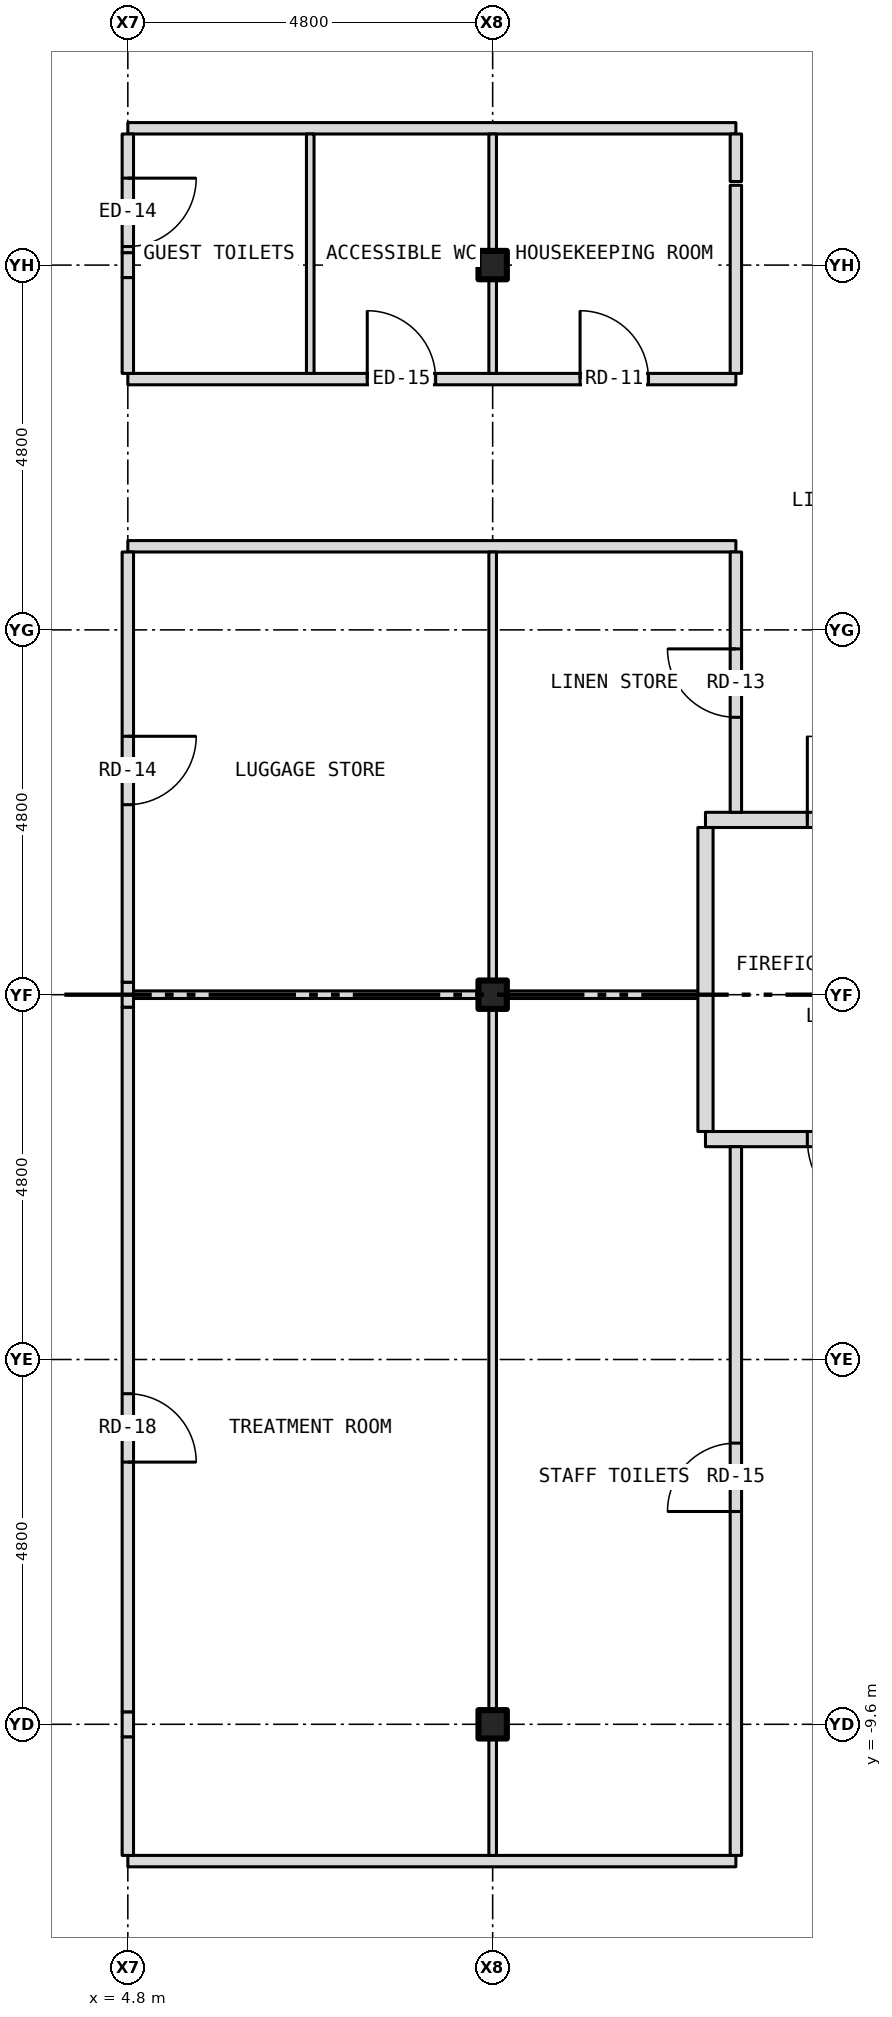
"""IFC4 building model, lengths in metres.
Left out: names, types, materials, properties, quantities, classifications, styles, units other than length and angle.
Written with IfcOpenShell. Run it as: python <this file> out.ifc"""

import sys

from ifc_helpers import new_model, si_unit, direction, frame, frame_2d, origin, origin_2d, place, context, subcontext, project, spatial, rectangle, i_section, extrude, element, fill, save


model = new_model("IFC4")
c1 = context("Model", 3, precision=1e-05, world=origin(), true_north=direction((0.0, 1.0)))
c2 = subcontext(c1, "Body", "Model", "MODEL_VIEW")
j1 = project(units=[si_unit("LENGTHUNIT", "METRE"), si_unit("PLANEANGLEUNIT", "RADIAN")], contexts=[c1])
p1 = place(None, origin())
s1 = spatial("IfcSite", under=j1, at=p1, CompositionType="ELEMENT")
p2 = place(p1, origin())
s2 = spatial("IfcBuilding", under=s1, at=p2, CompositionType="ELEMENT")
p3 = place(p2, frame((0.0, 0.0, 162.0)))
s3 = spatial("IfcBuildingStorey", under=s2, at=p3, CompositionType="ELEMENT", Elevation=162.0)
for number, where, z_axis, x_axis in (
    (1, (9.6, -9.6, -0.15), (0.0, 0.0, 1.0), (1.0, 0.0, 0.0)),
    (2, (9.6, 0.0, -0.15), (0.0, 0.0, 1.0), (1.0, 0.0, 0.0)),
    (3, (9.6, 9.6, -0.15), (0.0, 0.0, 1.0), (1.0, 0.0, 0.0)),
):
    element("IfcColumn", number, at=place(p3, frame(where, z_axis=z_axis, x_axis=x_axis)), inside=s3, PredefinedType="COLUMN", context=c2, shape_type="SweptSolid", body=[
        extrude(i_section(OverallWidth=0.373, OverallDepth=0.373, WebThickness=0.016, FlangeThickness=0.026, at=origin_2d()), origin(), (0.0, 0.0, 1.0), 3.5),
    ])
p4 = place(p3, frame((4.8, -11.4, 0.0), z_axis=(0.0, 0.0, 1.0), x_axis=(1.0, 0.0, 0.0)))
e4 = element("IfcWall", 4, at=p4, inside=s3, PredefinedType="PARTITIONING", context=c2, shape_type="SweptSolid", body=[
    extrude(rectangle(XDim=8.0, YDim=0.15, at=frame_2d((4.0, 0.0))), origin(), (0.0, 0.0, 1.0), 3.35),
])
p5 = place(p3, frame((12.4, -1.9, 0.0), z_axis=(0.0, 0.0, 1.0), x_axis=(1.0, 0.0, 0.0)))
e5 = element("IfcWall", 5, at=p5, inside=s3, PredefinedType="PARTITIONING", context=c2, shape_type="SweptSolid", body=[
    extrude(rectangle(XDim=3.28, YDim=0.2, at=frame_2d((1.64, 0.0))), origin(), (0.0, 0.0, 1.0), 3.35),
])
p6 = place(p5, frame((1.34, 0.0, 0.0)))
e6 = element("IfcOpeningElement", 6, at=p6, cuts=e5, PredefinedType="OPENING", context=c2, shape_type="SweptSolid", body=[
    extrude(rectangle(XDim=1.1, YDim=2.1, at=frame_2d((0.55, 1.05))), frame((0.0, 0.112, 0.0), z_axis=(0.0, -1.0, 0.0), x_axis=(1.0, 0.0, 0.0)), (0.0, 0.0, 1.0), 0.224),
])
p7 = place(p3, frame((4.8, 0.0, 0.0), z_axis=(0.0, 0.0, 1.0), x_axis=(1.0, 0.0, 0.0)))
e7 = element("IfcWall", 7, at=p7, inside=s3, PredefinedType="PARTITIONING", context=c2, shape_type="SweptSolid", body=[
    extrude(rectangle(XDim=4.613, YDim=0.1, at=frame_2d((2.307, 0.0))), origin(), (0.0, 0.0, 1.0), 2.728),
])
p8 = place(p3, frame((9.413, 0.0, 0.0), z_axis=(0.0, 0.0, 1.0), x_axis=(1.0, 0.0, 0.0)))
e8 = element("IfcWall", 8, at=p8, inside=s3, PredefinedType="PARTITIONING", context=c2, shape_type="SweptSolid", body=[
    extrude(rectangle(XDim=0.374, YDim=0.1, at=frame_2d((0.187, 0.0))), origin(), (0.0, 0.0, 1.0), 3.35),
])
p9 = place(p3, frame((9.787, 0.0, 0.0), z_axis=(0.0, 0.0, 1.0), x_axis=(1.0, 0.0, 0.0)))
e9 = element("IfcWall", 9, at=p9, inside=s3, PredefinedType="PARTITIONING", context=c2, shape_type="SweptSolid", body=[
    extrude(rectangle(XDim=2.613, YDim=0.1, at=frame_2d((1.306, 0.0))), origin(), (0.0, 0.0, 1.0), 2.728),
])
p10 = place(p3, frame((12.4, 2.3, 0.0), z_axis=(0.0, 0.0, 1.0), x_axis=(1.0, 0.0, 0.0)))
e10 = element("IfcWall", 10, at=p10, inside=s3, PredefinedType="PARTITIONING", context=c2, shape_type="SweptSolid", body=[
    extrude(rectangle(XDim=3.28, YDim=0.2, at=frame_2d((1.64, 0.0))), origin(), (0.0, 0.0, 1.0), 3.35),
])
p11 = place(p10, frame((1.34, 0.0, 0.0)))
e11 = element("IfcOpeningElement", 11, at=p11, cuts=e10, PredefinedType="OPENING", context=c2, shape_type="SweptSolid", body=[
    extrude(rectangle(XDim=1.1, YDim=2.1, at=frame_2d((0.55, 1.05))), frame((0.0, 0.112, 0.0), z_axis=(0.0, -1.0, 0.0), x_axis=(1.0, 0.0, 0.0)), (0.0, 0.0, 1.0), 0.224),
])
p12 = place(p3, frame((4.8, 5.9, 0.0), z_axis=(0.0, 0.0, 1.0), x_axis=(1.0, 0.0, 0.0)))
e12 = element("IfcWall", 12, at=p12, inside=s3, PredefinedType="PARTITIONING", context=c2, shape_type="SweptSolid", body=[
    extrude(rectangle(XDim=8.0, YDim=0.15, at=frame_2d((4.0, 0.0))), origin(), (0.0, 0.0, 1.0), 3.35),
])
p13 = place(p3, frame((4.8, 8.1, 0.0), z_axis=(0.0, 0.0, 1.0), x_axis=(1.0, 0.0, 0.0)))
e13 = element("IfcWall", 13, at=p13, inside=s3, PredefinedType="PARTITIONING", context=c2, shape_type="SweptSolid", body=[
    extrude(rectangle(XDim=8.0, YDim=0.15, at=frame_2d((4.0, 0.0))), origin(), (0.0, 0.0, 1.0), 3.35),
])
p14 = place(p13, frame((5.95, 0.0, 0.0)))
e14 = element("IfcOpeningElement", 14, at=p14, cuts=e13, PredefinedType="OPENING", context=c2, shape_type="SweptSolid", body=[
    extrude(rectangle(XDim=0.9, YDim=2.1, at=frame_2d((0.45, 1.05))), frame((0.0, 0.087, 0.0), z_axis=(0.0, -1.0, 0.0), x_axis=(1.0, 0.0, 0.0)), (0.0, 0.0, 1.0), 0.174),
])
p15 = place(p13, frame((3.15, 0.0, 0.0)))
e15 = element("IfcOpeningElement", 15, at=p15, cuts=e13, PredefinedType="OPENING", context=c2, shape_type="SweptSolid", body=[
    extrude(rectangle(XDim=0.9, YDim=2.1, at=frame_2d((0.45, 1.05))), frame((0.0, 0.087, 0.0), z_axis=(0.0, -1.0, 0.0), x_axis=(1.0, 0.0, 0.0)), (0.0, 0.0, 1.0), 0.174),
])
p16 = place(p3, frame((4.8, 11.4, 0.0), z_axis=(0.0, 0.0, 1.0), x_axis=(1.0, 0.0, 0.0)))
e16 = element("IfcWall", 16, at=p16, inside=s3, PredefinedType="PARTITIONING", context=c2, shape_type="SweptSolid", body=[
    extrude(rectangle(XDim=8.0, YDim=0.15, at=frame_2d((4.0, 0.0))), origin(), (0.0, 0.0, 1.0), 3.35),
])
p17 = place(p3, frame((4.8, -11.325, 0.0), z_axis=(0.0, 0.0, 1.0), x_axis=(0.0, 1.0, 0.0)))
e17 = element("IfcWall", 17, at=p17, inside=s3, PredefinedType="PARTITIONING", context=c2, shape_type="SweptSolid", body=[
    extrude(rectangle(XDim=1.561, YDim=0.15, at=frame_2d((0.781, 0.0))), origin(), (0.0, 0.0, 1.0), 2.817),
])
p18 = place(p3, frame((4.8, -9.764, 0.0), z_axis=(0.0, 0.0, 1.0), x_axis=(0.0, 1.0, 0.0)))
e18 = element("IfcWall", 18, at=p18, inside=s3, PredefinedType="PARTITIONING", context=c2, shape_type="SweptSolid", body=[
    extrude(rectangle(XDim=0.328, YDim=0.15, at=frame_2d((0.164, 0.0))), origin(), (0.0, 0.0, 1.0), 3.35),
])
p19 = place(p3, frame((4.8, -9.436, 0.0), z_axis=(0.0, 0.0, 1.0), x_axis=(0.0, 1.0, 0.0)))
e19 = element("IfcWall", 19, at=p19, inside=s3, PredefinedType="PARTITIONING", context=c2, shape_type="SweptSolid", body=[
    extrude(rectangle(XDim=9.272, YDim=0.15, at=frame_2d((4.636, 0.0))), origin(), (0.0, 0.0, 1.0), 2.817),
])
p20 = place(p19, frame((3.286, 0.0, 0.0)))
e20 = element("IfcOpeningElement", 20, at=p20, cuts=e19, PredefinedType="OPENING", context=c2, shape_type="SweptSolid", body=[
    extrude(rectangle(XDim=0.9, YDim=2.1, at=frame_2d((0.45, 1.05))), frame((0.0, 0.087, 0.0), z_axis=(0.0, -1.0, 0.0), x_axis=(1.0, 0.0, 0.0)), (0.0, 0.0, 1.0), 0.174),
])
p21 = place(p3, frame((4.8, -0.164, 0.0), z_axis=(0.0, 0.0, 1.0), x_axis=(0.0, 1.0, 0.0)))
e21 = element("IfcWall", 21, at=p21, inside=s3, PredefinedType="PARTITIONING", context=c2, shape_type="SweptSolid", body=[
    extrude(rectangle(XDim=0.328, YDim=0.15, at=frame_2d((0.164, 0.0))), origin(), (0.0, 0.0, 1.0), 3.35),
])
p22 = place(p3, frame((4.8, 0.164, 0.0), z_axis=(0.0, 0.0, 1.0), x_axis=(0.0, 1.0, 0.0)))
e22 = element("IfcWall", 22, at=p22, inside=s3, PredefinedType="PARTITIONING", context=c2, shape_type="SweptSolid", body=[
    extrude(rectangle(XDim=5.661, YDim=0.15, at=frame_2d((2.831, 0.0))), origin(), (0.0, 0.0, 1.0), 2.817),
])
p23 = place(p22, frame((2.336, 0.0, 0.0)))
e23 = element("IfcOpeningElement", 23, at=p23, cuts=e22, PredefinedType="OPENING", context=c2, shape_type="SweptSolid", body=[
    extrude(rectangle(XDim=0.9, YDim=2.1, at=frame_2d((0.45, 1.05))), frame((0.0, 0.087, 0.0), z_axis=(0.0, -1.0, 0.0), x_axis=(1.0, 0.0, 0.0)), (0.0, 0.0, 1.0), 0.174),
])
p24 = place(p3, frame((4.8, 8.175, 0.0), z_axis=(0.0, 0.0, 1.0), x_axis=(0.0, 1.0, 0.0)))
e24 = element("IfcWall", 24, at=p24, inside=s3, PredefinedType="PARTITIONING", context=c2, shape_type="SweptSolid", body=[
    extrude(rectangle(XDim=1.261, YDim=0.15, at=frame_2d((0.63, 0.0))), origin(), (0.0, 0.0, 1.0), 2.817),
])
p25 = place(p3, frame((4.8, 9.436, 0.0), z_axis=(0.0, 0.0, 1.0), x_axis=(0.0, 1.0, 0.0)))
e25 = element("IfcWall", 25, at=p25, inside=s3, PredefinedType="PARTITIONING", context=c2, shape_type="SweptSolid", body=[
    extrude(rectangle(XDim=0.328, YDim=0.15, at=frame_2d((0.164, 0.0))), origin(), (0.0, 0.0, 1.0), 3.35),
])
p26 = place(p3, frame((4.8, 9.764, 0.0), z_axis=(0.0, 0.0, 1.0), x_axis=(0.0, 1.0, 0.0)))
e26 = element("IfcWall", 26, at=p26, inside=s3, PredefinedType="PARTITIONING", context=c2, shape_type="SweptSolid", body=[
    extrude(rectangle(XDim=1.561, YDim=0.15, at=frame_2d((0.781, 0.0))), origin(), (0.0, 0.0, 1.0), 2.817),
])
p27 = place(p26, frame((0.08, 0.0, 0.0)))
e27 = element("IfcOpeningElement", 27, at=p27, cuts=e26, PredefinedType="OPENING", context=c2, shape_type="SweptSolid", body=[
    extrude(rectangle(XDim=0.9, YDim=2.1, at=frame_2d((0.45, 1.05))), frame((0.0, 0.087, 0.0), z_axis=(0.0, -1.0, 0.0), x_axis=(1.0, 0.0, 0.0)), (0.0, 0.0, 1.0), 0.174),
])
p28 = place(p3, frame((7.2, 8.175, 0.0), z_axis=(0.0, 0.0, 1.0), x_axis=(0.0, 1.0, 0.0)))
e28 = element("IfcWall", 28, at=p28, inside=s3, PredefinedType="PARTITIONING", context=c2, shape_type="SweptSolid", body=[
    extrude(rectangle(XDim=3.15, YDim=0.1, at=frame_2d((1.575, 0.0))), origin(), (0.0, 0.0, 1.0), 3.35),
])
p29 = place(p3, frame((9.6, -11.325, 0.0), z_axis=(0.0, 0.0, 1.0), x_axis=(0.0, 1.0, 0.0)))
e29 = element("IfcWall", 29, at=p29, inside=s3, PredefinedType="PARTITIONING", context=c2, shape_type="SweptSolid", body=[
    extrude(rectangle(XDim=1.538, YDim=0.1, at=frame_2d((0.769, 0.0))), origin(), (0.0, 0.0, 1.0), 2.728),
])
p30 = place(p3, frame((9.6, -9.787, 0.0), z_axis=(0.0, 0.0, 1.0), x_axis=(0.0, 1.0, 0.0)))
e30 = element("IfcWall", 30, at=p30, inside=s3, PredefinedType="PARTITIONING", context=c2, shape_type="SweptSolid", body=[
    extrude(rectangle(XDim=0.374, YDim=0.1, at=frame_2d((0.187, 0.0))), origin(), (0.0, 0.0, 1.0), 3.35),
])
p31 = place(p3, frame((9.6, -9.413, 0.0), z_axis=(0.0, 0.0, 1.0), x_axis=(0.0, 1.0, 0.0)))
e31 = element("IfcWall", 31, at=p31, inside=s3, PredefinedType="PARTITIONING", context=c2, shape_type="SweptSolid", body=[
    extrude(rectangle(XDim=9.363, YDim=0.1, at=frame_2d((4.682, 0.0))), origin(), (0.0, 0.0, 1.0), 2.728),
])
p32 = place(p3, frame((9.6, 0.05, 0.0), z_axis=(0.0, 0.0, 1.0), x_axis=(0.0, 1.0, 0.0)))
e32 = element("IfcWall", 32, at=p32, inside=s3, PredefinedType="PARTITIONING", context=c2, shape_type="SweptSolid", body=[
    extrude(rectangle(XDim=5.775, YDim=0.1, at=frame_2d((2.887, 0.0))), origin(), (0.0, 0.0, 1.0), 2.728),
])
p33 = place(p3, frame((9.6, 8.175, 0.0), z_axis=(0.0, 0.0, 1.0), x_axis=(0.0, 1.0, 0.0)))
e33 = element("IfcWall", 33, at=p33, inside=s3, PredefinedType="PARTITIONING", context=c2, shape_type="SweptSolid", body=[
    extrude(rectangle(XDim=1.238, YDim=0.1, at=frame_2d((0.619, 0.0))), origin(), (0.0, 0.0, 1.0), 2.728),
])
p34 = place(p3, frame((9.6, 9.413, 0.0), z_axis=(0.0, 0.0, 1.0), x_axis=(0.0, 1.0, 0.0)))
e34 = element("IfcWall", 34, at=p34, inside=s3, PredefinedType="PARTITIONING", context=c2, shape_type="SweptSolid", body=[
    extrude(rectangle(XDim=0.374, YDim=0.1, at=frame_2d((0.187, 0.0))), origin(), (0.0, 0.0, 1.0), 3.35),
])
p35 = place(p3, frame((9.6, 9.787, 0.0), z_axis=(0.0, 0.0, 1.0), x_axis=(0.0, 1.0, 0.0)))
e35 = element("IfcWall", 35, at=p35, inside=s3, PredefinedType="PARTITIONING", context=c2, shape_type="SweptSolid", body=[
    extrude(rectangle(XDim=1.538, YDim=0.1, at=frame_2d((0.769, 0.0))), origin(), (0.0, 0.0, 1.0), 2.728),
])
p36 = place(p3, frame((12.4, -1.8, 0.0), z_axis=(0.0, 0.0, 1.0), x_axis=(0.0, 1.0, 0.0)))
e36 = element("IfcWall", 36, at=p36, inside=s3, PredefinedType="PARTITIONING", context=c2, shape_type="SweptSolid", body=[
    extrude(rectangle(XDim=4.0, YDim=0.2, at=frame_2d((2.0, 0.0))), origin(), (0.0, 0.0, 1.0), 3.35),
])
p37 = place(p3, frame((12.8, -11.325, 0.0), z_axis=(0.0, 0.0, 1.0), x_axis=(0.0, 1.0, 0.0)))
e37 = element("IfcWall", 37, at=p37, inside=s3, PredefinedType="PARTITIONING", context=c2, shape_type="SweptSolid", body=[
    extrude(rectangle(XDim=9.325, YDim=0.15, at=frame_2d((4.663, 0.0))), origin(), (0.0, 0.0, 1.0), 3.35),
])
p38 = place(p37, frame((4.525, 0.0, 0.0)))
e38 = element("IfcOpeningElement", 38, at=p38, cuts=e37, PredefinedType="OPENING", context=c2, shape_type="SweptSolid", body=[
    extrude(rectangle(XDim=0.9, YDim=2.1, at=frame_2d((0.45, 1.05))), frame((0.0, 0.087, 0.0), z_axis=(0.0, -1.0, 0.0), x_axis=(1.0, 0.0, 0.0)), (0.0, 0.0, 1.0), 0.174),
])
p39 = place(p3, frame((12.8, 2.4, 0.0), z_axis=(0.0, 0.0, 1.0), x_axis=(0.0, 1.0, 0.0)))
e39 = element("IfcWall", 39, at=p39, inside=s3, PredefinedType="PARTITIONING", context=c2, shape_type="SweptSolid", body=[
    extrude(rectangle(XDim=3.425, YDim=0.15, at=frame_2d((1.712, 0.0))), origin(), (0.0, 0.0, 1.0), 3.35),
])
p40 = place(p39, frame((1.25, 0.0, 0.0)))
e40 = element("IfcOpeningElement", 40, at=p40, cuts=e39, PredefinedType="OPENING", context=c2, shape_type="SweptSolid", body=[
    extrude(rectangle(XDim=0.9, YDim=2.1, at=frame_2d((0.45, 1.05))), frame((0.0, 0.087, 0.0), z_axis=(0.0, -1.0, 0.0), x_axis=(1.0, 0.0, 0.0)), (0.0, 0.0, 1.0), 0.174),
])
p41 = place(p3, frame((12.8, 8.175, 0.0), z_axis=(0.0, 0.0, 1.0), x_axis=(0.0, 1.0, 0.0)))
e41 = element("IfcWall", 41, at=p41, inside=s3, PredefinedType="PARTITIONING", context=c2, shape_type="SweptSolid", body=[
    extrude(rectangle(XDim=2.475, YDim=0.15, at=frame_2d((1.237, 0.0))), origin(), (0.0, 0.0, 1.0), 3.35),
])
p42 = place(p3, frame((12.8, 10.7, 0.0), z_axis=(0.0, 0.0, 1.0), x_axis=(0.0, 1.0, 0.0)))
e42 = element("IfcWall", 42, at=p42, inside=s3, PredefinedType="PARTITIONING", context=c2, shape_type="SweptSolid", body=[
    extrude(rectangle(XDim=0.625, YDim=0.15, at=frame_2d((0.312, 0.0))), origin(), (0.0, 0.0, 1.0), 3.35),
])
p43 = place(p11, origin())
e43 = element("IfcDoor", 43, at=p43, inside=s3, OperationType="SINGLE_SWING_LEFT", PredefinedType="DOOR", context=c2, shape_type="SweptSolid", body=[
    extrude(rectangle(XDim=1.1, YDim=2.1, at=frame_2d((0.55, 1.05))), frame((0.0, 0.025, 0.0), z_axis=(0.0, -1.0, 0.0), x_axis=(1.0, 0.0, 0.0)), (0.0, 0.0, 1.0), 0.05),
])
fill(e11, e43)
p44 = place(p6, origin())
e44 = element("IfcDoor", 44, at=p44, inside=s3, OperationType="SINGLE_SWING_RIGHT", PredefinedType="DOOR", context=c2, shape_type="SweptSolid", body=[
    extrude(rectangle(XDim=1.1, YDim=2.1, at=frame_2d((0.55, 1.05))), frame((0.0, 0.025, 0.0), z_axis=(0.0, -1.0, 0.0), x_axis=(1.0, 0.0, 0.0)), (0.0, 0.0, 1.0), 0.05),
])
fill(e6, e44)
p45 = place(p14, origin())
e45 = element("IfcDoor", 45, at=p45, inside=s3, OperationType="SINGLE_SWING_LEFT", PredefinedType="DOOR", context=c2, shape_type="SweptSolid", body=[
    extrude(rectangle(XDim=0.9, YDim=2.1, at=frame_2d((0.45, 1.05))), frame((0.0, 0.025, 0.0), z_axis=(0.0, -1.0, 0.0), x_axis=(1.0, 0.0, 0.0)), (0.0, 0.0, 1.0), 0.05),
])
fill(e14, e45)
p46 = place(p27, origin())
e46 = element("IfcDoor", 46, at=p46, inside=s3, OperationType="SINGLE_SWING_RIGHT", PredefinedType="DOOR", context=c2, shape_type="SweptSolid", body=[
    extrude(rectangle(XDim=0.9, YDim=2.1, at=frame_2d((0.45, 1.05))), frame((0.0, 0.025, 0.0), z_axis=(0.0, -1.0, 0.0), x_axis=(1.0, 0.0, 0.0)), (0.0, 0.0, 1.0), 0.05),
])
fill(e27, e46)
p47 = place(p15, origin())
e47 = element("IfcDoor", 47, at=p47, inside=s3, OperationType="SINGLE_SWING_LEFT", PredefinedType="DOOR", context=c2, shape_type="SweptSolid", body=[
    extrude(rectangle(XDim=0.9, YDim=2.1, at=frame_2d((0.45, 1.05))), frame((0.0, 0.025, 0.0), z_axis=(0.0, -1.0, 0.0), x_axis=(1.0, 0.0, 0.0)), (0.0, 0.0, 1.0), 0.05),
])
fill(e15, e47)
p48 = place(p40, origin())
e48 = element("IfcDoor", 48, at=p48, inside=s3, OperationType="SINGLE_SWING_RIGHT", PredefinedType="DOOR", context=c2, shape_type="SweptSolid", body=[
    extrude(rectangle(XDim=0.9, YDim=2.1, at=frame_2d((0.45, 1.05))), frame((0.0, 0.025, 0.0), z_axis=(0.0, -1.0, 0.0), x_axis=(1.0, 0.0, 0.0)), (0.0, 0.0, 1.0), 0.05),
])
fill(e40, e48)
p49 = place(p23, origin())
e49 = element("IfcDoor", 49, at=p49, inside=s3, OperationType="SINGLE_SWING_RIGHT", PredefinedType="DOOR", context=c2, shape_type="SweptSolid", body=[
    extrude(rectangle(XDim=0.9, YDim=2.1, at=frame_2d((0.45, 1.05))), frame((0.0, 0.025, 0.0), z_axis=(0.0, -1.0, 0.0), x_axis=(1.0, 0.0, 0.0)), (0.0, 0.0, 1.0), 0.05),
])
fill(e23, e49)
p50 = place(p38, origin())
e50 = element("IfcDoor", 50, at=p50, inside=s3, OperationType="SINGLE_SWING_LEFT", PredefinedType="DOOR", context=c2, shape_type="SweptSolid", body=[
    extrude(rectangle(XDim=0.9, YDim=2.1, at=frame_2d((0.45, 1.05))), frame((0.0, 0.025, 0.0), z_axis=(0.0, -1.0, 0.0), x_axis=(1.0, 0.0, 0.0)), (0.0, 0.0, 1.0), 0.05),
])
fill(e38, e50)
p51 = place(p20, origin())
e51 = element("IfcDoor", 51, at=p51, inside=s3, OperationType="SINGLE_SWING_LEFT", PredefinedType="DOOR", context=c2, shape_type="SweptSolid", body=[
    extrude(rectangle(XDim=0.9, YDim=2.1, at=frame_2d((0.45, 1.05))), frame((0.0, 0.025, 0.0), z_axis=(0.0, -1.0, 0.0), x_axis=(1.0, 0.0, 0.0)), (0.0, 0.0, 1.0), 0.05),
])
fill(e20, e51)
save(model, sys.argv[1])
